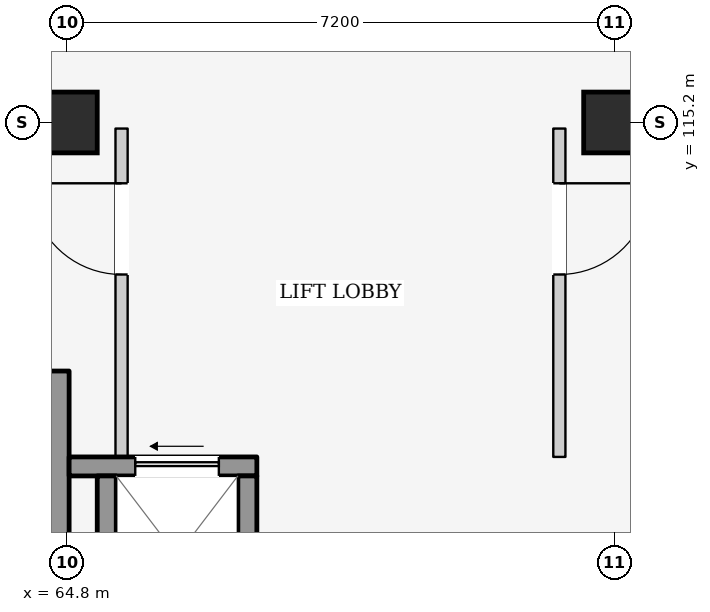
"""IFC4 building model, lengths in metres.
Left out: names, types, materials, properties, quantities, classifications, styles, units other than length and angle.
Written with IfcOpenShell. Run it as: python <this file> out.ifc"""

import sys

from ifc_helpers import new_model, si_unit, direction, frame, frame_2d, origin, origin_2d, place, context, subcontext, project, spatial, rectangle, extrude, element, fill, save


model = new_model("IFC4")
c1 = context("Model", 3, precision=1e-05, world=origin(), true_north=direction((0.0, 1.0)))
c2 = subcontext(c1, "Body", "Model", "MODEL_VIEW")
j1 = project(units=[si_unit("LENGTHUNIT", "METRE"), si_unit("PLANEANGLEUNIT", "RADIAN")], contexts=[c1])
p1 = place(None, origin())
s1 = spatial("IfcSite", under=j1, at=p1, CompositionType="ELEMENT")
p2 = place(p1, origin())
s2 = spatial("IfcBuilding", under=s1, at=p2, CompositionType="ELEMENT")
p3 = place(p2, frame((0.0, 0.0, -4.2)))
s3 = spatial("IfcBuildingStorey", under=s2, at=p3, CompositionType="ELEMENT", Elevation=-4.2)
for number, where, z_axis, x_axis in (
    (1, (64.8, 115.2, 0.0), (0.0, 0.0, 1.0), (1.0, 0.0, 0.0)),
    (2, (72.0, 115.2, 0.0), (0.0, 0.0, 1.0), (1.0, 0.0, 0.0)),
):
    element("IfcColumn", number, at=place(p3, frame(where, z_axis=z_axis, x_axis=x_axis)), inside=s3, PredefinedType="COLUMN", context=c2, shape_type="SweptSolid", body=[
        extrude(rectangle(XDim=0.8, YDim=0.8, at=origin_2d()), origin(), (0.0, 0.0, 1.0), 4.2),
    ])
p4 = place(p3, frame((64.64, 108.07, 0.0), z_axis=(0.0, 0.0, 1.0), x_axis=(0.0, 1.0, 0.0)))
e3 = element("IfcWall", 3, at=p4, inside=s3, PredefinedType="SHEAR", context=c2, shape_type="SweptSolid", body=[
    extrude(rectangle(XDim=3.86, YDim=0.38, at=frame_2d((1.93, 0.0))), origin(), (0.0, 0.0, 1.0), 3.79),
])
p5 = place(p3, frame((65.52, 110.8, 0.0), z_axis=(0.0, 0.0, 1.0), x_axis=(0.0, 1.0, 0.0)))
e4 = element("IfcWall", 4, at=p5, inside=s3, PredefinedType="PARTITIONING", context=c2, shape_type="SweptSolid", body=[
    extrude(rectangle(XDim=4.32, YDim=0.16, at=frame_2d((2.16, 0.0))), origin(), (0.0, 0.0, 1.0), 3.79),
])
p6 = place(p5, frame((2.4, 0.0, 0.0)))
e5 = element("IfcOpeningElement", 5, at=p6, cuts=e4, PredefinedType="OPENING", context=c2, shape_type="SweptSolid", body=[
    extrude(rectangle(XDim=1.2, YDim=2.2, at=frame_2d((0.6, 1.1))), frame((0.0, 0.095, 0.0), z_axis=(0.0, -1.0, 0.0), x_axis=(1.0, 0.0, 0.0)), (0.0, 0.0, 1.0), 0.19),
])
p7 = place(p3, frame((71.28, 110.8, 0.0), z_axis=(0.0, 0.0, 1.0), x_axis=(0.0, 1.0, 0.0)))
e6 = element("IfcWall", 6, at=p7, inside=s3, PredefinedType="PARTITIONING", context=c2, shape_type="SweptSolid", body=[
    extrude(rectangle(XDim=4.32, YDim=0.16, at=frame_2d((2.16, 0.0))), origin(), (0.0, 0.0, 1.0), 3.79),
])
p8 = place(p7, frame((2.4, 0.0, 0.0)))
e7 = element("IfcOpeningElement", 7, at=p8, cuts=e6, PredefinedType="OPENING", context=c2, shape_type="SweptSolid", body=[
    extrude(rectangle(XDim=1.2, YDim=2.2, at=frame_2d((0.6, 1.1))), frame((0.0, 0.095, 0.0), z_axis=(0.0, -1.0, 0.0), x_axis=(1.0, 0.0, 0.0)), (0.0, 0.0, 1.0), 0.19),
])
p9 = place(p3, frame((64.83, 110.675, 0.0), z_axis=(0.0, 0.0, 1.0), x_axis=(1.0, 0.0, 0.0)))
e8 = element("IfcWall", 8, at=p9, inside=s3, PredefinedType="SHEAR", context=c2, shape_type="SweptSolid", body=[
    extrude(rectangle(XDim=2.47, YDim=0.25, at=frame_2d((1.235, 0.0))), origin(), (0.0, 0.0, 1.0), 3.79),
])
p10 = place(p9, frame((0.87, 0.0, 0.0)))
e9 = element("IfcOpeningElement", 9, at=p10, cuts=e8, PredefinedType="OPENING", context=c2, shape_type="SweptSolid", body=[
    extrude(rectangle(XDim=1.1, YDim=2.15, at=frame_2d((0.55, 1.075))), frame((0.0, 0.14, 0.0), z_axis=(0.0, -1.0, 0.0), x_axis=(1.0, 0.0, 0.0)), (0.0, 0.0, 1.0), 0.28),
])
for number, where, z_axis, x_axis in (
    (10, (65.325, 108.45, 0.0), (0.0, 0.0, 1.0), (0.0, 1.0, 0.0)),
    (11, (67.175, 108.45, 0.0), (0.0, 0.0, 1.0), (0.0, 1.0, 0.0)),
):
    element("IfcWall", number, at=place(p3, frame(where, z_axis=z_axis, x_axis=x_axis)), inside=s3, PredefinedType="SHEAR", context=c2, shape_type="SweptSolid", body=[
        extrude(rectangle(XDim=2.1, YDim=0.25, at=frame_2d((1.05, 0.0))), origin(), (0.0, 0.0, 1.0), 3.79),
    ])
p11 = place(p6, origin())
e12 = element("IfcDoor", 12, at=p11, inside=s3, OperationType="SINGLE_SWING_RIGHT", PredefinedType="DOOR", context=c2, shape_type="SweptSolid", body=[
    extrude(rectangle(XDim=1.2, YDim=2.2, at=frame_2d((0.6, 1.1))), frame((0.0, 0.025, 0.0), z_axis=(0.0, -1.0, 0.0), x_axis=(1.0, 0.0, 0.0)), (0.0, 0.0, 1.0), 0.05),
])
fill(e5, e12)
p12 = place(p8, frame((1.2, 0.0, 0.0), z_axis=(0.0, 0.0, 1.0), x_axis=(-1.0, 0.0, 0.0)))
e13 = element("IfcDoor", 13, at=p12, inside=s3, OperationType="SINGLE_SWING_LEFT", PredefinedType="DOOR", context=c2, shape_type="SweptSolid", body=[
    extrude(rectangle(XDim=1.2, YDim=2.2, at=frame_2d((0.6, 1.1))), frame((0.0, 0.025, 0.0), z_axis=(0.0, -1.0, 0.0), x_axis=(1.0, 0.0, 0.0)), (0.0, 0.0, 1.0), 0.05),
])
fill(e7, e13)
p13 = place(p10, origin())
e14 = element("IfcDoor", 14, at=p13, inside=s3, OperationType="SLIDING_TO_LEFT", PredefinedType="DOOR", context=c2, shape_type="SweptSolid", body=[
    extrude(rectangle(XDim=1.1, YDim=2.15, at=frame_2d((0.55, 1.075))), frame((0.0, 0.025, 0.0), z_axis=(0.0, -1.0, 0.0), x_axis=(1.0, 0.0, 0.0)), (0.0, 0.0, 1.0), 0.05),
])
fill(e9, e14)
save(model, sys.argv[1])
